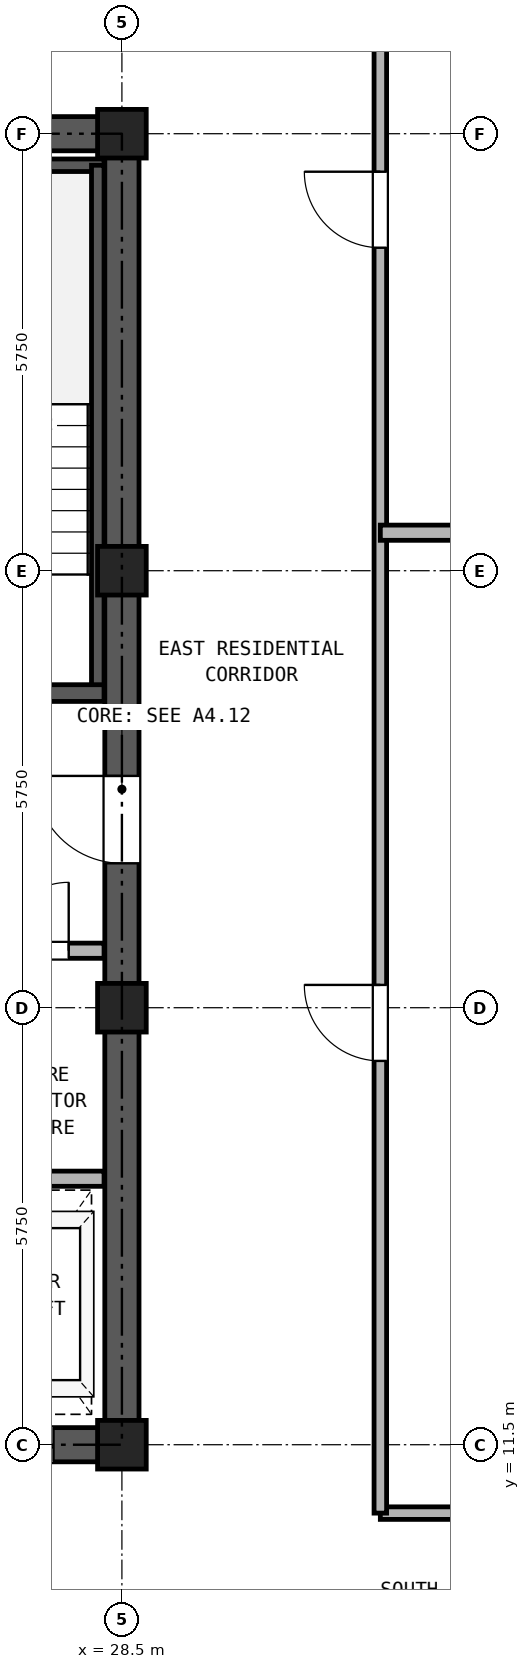
"""IFC4 building model, lengths in metres.
Left out: names, types, materials, properties, quantities, classifications, styles, units other than length and angle.
Written with IfcOpenShell. Run it as: python <this file> out.ifc"""

import sys

from ifc_helpers import new_model, si_unit, direction, frame, frame_2d, origin, origin_2d, place, context, subcontext, project, spatial, rectangle, hollow_rectangle, extrude, source, transform, mapped, element, fill, save


model = new_model("IFC4")
c1 = context("Model", 3, precision=1e-05, world=origin(), true_north=direction((0.0, 1.0)))
c2 = subcontext(c1, "Body", "Model", "MODEL_VIEW")
j1 = project(units=[si_unit("LENGTHUNIT", "METRE"), si_unit("PLANEANGLEUNIT", "RADIAN")], contexts=[c1])
p1 = place(None, origin())
s1 = spatial("IfcSite", under=j1, at=p1, CompositionType="ELEMENT")
p2 = place(p1, origin())
s2 = spatial("IfcBuilding", under=s1, at=p2, CompositionType="ELEMENT")
p3 = place(p2, frame((0.0, 0.0, 196.4)))
s3 = spatial("IfcBuildingStorey", under=s2, at=p3, CompositionType="ELEMENT", Elevation=196.4)
m1 = source(origin(), c2, "Body", "SweptSolid", [
    extrude(hollow_rectangle(XDim=0.64, YDim=0.64, WallThickness=0.035, at=origin_2d()), origin(), (0.0, 0.0, 1.0), 2.95),
])
for number, where, z_axis, x_axis in (
    (1, (28.5, 11.5, 0.0), (0.0, 0.0, 1.0), (1.0, 0.0, 0.0)),
    (2, (28.5, 17.25, 0.0), (0.0, 0.0, 1.0), (1.0, 0.0, 0.0)),
    (3, (28.5, 23.0, 0.0), (0.0, 0.0, 1.0), (1.0, 0.0, 0.0)),
    (4, (28.5, 28.75, 0.0), (0.0, 0.0, 1.0), (1.0, 0.0, 0.0)),
):
    element("IfcColumn", number, at=place(p3, frame(where, z_axis=z_axis, x_axis=x_axis)), inside=s3, PredefinedType="COLUMN", context=c2, shape_type="MappedRepresentation", body=[
        mapped(m1, transform((0.0, 0.0, 0.0), x_axis=(1.0, 0.0, 0.0), y_axis=(0.0, 1.0, 0.0), z_axis=(0.0, 0.0, 1.0), scale=1.0)),
    ])
p4 = place(p3, frame((18.275, 11.5, 0.0), z_axis=(0.0, 0.0, 1.0), x_axis=(1.0, 0.0, 0.0)))
e5 = element("IfcWall", 5, at=p4, inside=s3, PredefinedType="SHEAR", context=c2, shape_type="SweptSolid", body=[
    extrude(rectangle(XDim=10.45, YDim=0.45, at=frame_2d((5.225, 0.0))), origin(), (0.0, 0.0, 1.0), 2.95),
])
p5 = place(p4, frame((1.825, 0.0, 0.0)))
e6 = element("IfcOpeningElement", 6, at=p5, cuts=e5, PredefinedType="OPENING", context=c2, shape_type="SweptSolid", body=[
    extrude(rectangle(XDim=0.95, YDim=2.15, at=frame_2d((0.475, 1.075))), frame((0.0, 0.235, 0.0), z_axis=(0.0, -1.0, 0.0), x_axis=(1.0, 0.0, 0.0)), (0.0, 0.0, 1.0), 0.47),
])
p6 = place(p4, frame((5.325, 0.0, 0.0)))
e7 = element("IfcOpeningElement", 7, at=p6, cuts=e5, PredefinedType="OPENING", context=c2, shape_type="SweptSolid", body=[
    extrude(rectangle(XDim=0.95, YDim=2.15, at=frame_2d((0.475, 1.075))), frame((0.0, 0.235, 0.0), z_axis=(0.0, -1.0, 0.0), x_axis=(1.0, 0.0, 0.0)), (0.0, 0.0, 1.0), 0.47),
])
p7 = place(p4, frame((8.225, 0.0, 0.0)))
e8 = element("IfcOpeningElement", 8, at=p7, cuts=e5, PredefinedType="OPENING", context=c2, shape_type="SweptSolid", body=[
    extrude(rectangle(XDim=1.1, YDim=2.25, at=frame_2d((0.55, 1.125))), frame((0.0, 0.235, 0.0), z_axis=(0.0, -1.0, 0.0), x_axis=(1.0, 0.0, 0.0)), (0.0, 0.0, 1.0), 0.47),
])
p8 = place(p3, frame((18.275, 28.75, 0.0), z_axis=(0.0, 0.0, 1.0), x_axis=(1.0, 0.0, 0.0)))
e9 = element("IfcWall", 9, at=p8, inside=s3, PredefinedType="SHEAR", context=c2, shape_type="SweptSolid", body=[
    extrude(rectangle(XDim=10.45, YDim=0.45, at=frame_2d((5.225, 0.0))), origin(), (0.0, 0.0, 1.0), 2.95),
])
p9 = place(p8, frame((4.105, 0.0, 0.0)))
e10 = element("IfcOpeningElement", 10, at=p9, cuts=e9, PredefinedType="OPENING", context=c2, shape_type="SweptSolid", body=[
    extrude(rectangle(XDim=0.9, YDim=2.05, at=frame_2d((0.45, 1.025))), frame((0.0, 0.235, 0.0), z_axis=(0.0, -1.0, 0.0), x_axis=(1.0, 0.0, 0.0)), (0.0, 0.0, 1.0), 0.47),
])
p10 = place(p8, frame((5.645, 0.0, 0.0)))
e11 = element("IfcOpeningElement", 11, at=p10, cuts=e9, PredefinedType="OPENING", context=c2, shape_type="SweptSolid", body=[
    extrude(rectangle(XDim=0.9, YDim=2.05, at=frame_2d((0.45, 1.025))), frame((0.0, 0.235, 0.0), z_axis=(0.0, -1.0, 0.0), x_axis=(1.0, 0.0, 0.0)), (0.0, 0.0, 1.0), 0.47),
])
p11 = place(p3, frame((28.5, 11.725, 0.0), z_axis=(0.0, 0.0, 1.0), x_axis=(0.0, 1.0, 0.0)))
e12 = element("IfcWall", 12, at=p11, inside=s3, PredefinedType="SHEAR", context=c2, shape_type="SweptSolid", body=[
    extrude(rectangle(XDim=16.8, YDim=0.45, at=frame_2d((8.4, 0.0))), origin(), (0.0, 0.0, 1.0), 2.95),
])
p12 = place(p11, frame((7.425, 0.0, 0.0)))
e13 = element("IfcOpeningElement", 13, at=p12, cuts=e12, PredefinedType="OPENING", context=c2, shape_type="SweptSolid", body=[
    extrude(rectangle(XDim=1.15, YDim=2.2, at=frame_2d((0.575, 1.1))), frame((0.0, 0.235, 0.0), z_axis=(0.0, -1.0, 0.0), x_axis=(1.0, 0.0, 0.0)), (0.0, 0.0, 1.0), 0.47),
])
p13 = place(p3, frame((25.13, 28.335, 0.0), z_axis=(0.0, 0.0, 1.0), x_axis=(1.0, 0.0, 0.0)))
e14 = element("IfcWall", 14, at=p13, inside=s3, PredefinedType="PARTITIONING", context=c2, shape_type="SweptSolid", body=[
    extrude(rectangle(XDim=3.135, YDim=0.165, at=frame_2d((1.567, 0.0))), origin(), (0.0, 0.0, 1.0), 2.95),
])
p14 = place(p3, frame((28.183, 21.39, 0.0), z_axis=(0.0, 0.0, 1.0), x_axis=(0.0, 1.0, 0.0)))
e15 = element("IfcWall", 15, at=p14, inside=s3, PredefinedType="PARTITIONING", context=c2, shape_type="SweptSolid", body=[
    extrude(rectangle(XDim=6.945, YDim=0.165, at=frame_2d((3.473, 0.0))), origin(), (0.0, 0.0, 1.0), 2.95),
])
p15 = place(p3, frame((25.13, 21.39, 0.0), z_axis=(0.0, 0.0, 1.0), x_axis=(1.0, 0.0, 0.0)))
e16 = element("IfcWall", 16, at=p15, inside=s3, PredefinedType="SOLIDWALL", context=c2, shape_type="SweptSolid", body=[
    extrude(rectangle(XDim=3.135, YDim=0.22, at=frame_2d((1.567, 0.0))), origin(), (0.0, 0.0, 1.0), 2.95),
])
p16 = place(p15, frame((0.92, 0.0, 0.0)))
e17 = element("IfcOpeningElement", 17, at=p16, cuts=e16, PredefinedType="OPENING", context=c2, shape_type="SweptSolid", body=[
    extrude(rectangle(XDim=1.15, YDim=2.2, at=frame_2d((0.575, 1.1))), frame((0.0, 0.12, 0.0), z_axis=(0.0, -1.0, 0.0), x_axis=(1.0, 0.0, 0.0)), (0.0, 0.0, 1.0), 0.24),
])
p17 = place(p3, frame((18.735, 18.0, 0.0), z_axis=(0.0, 0.0, 1.0), x_axis=(1.0, 0.0, 0.0)))
e18 = element("IfcWall", 18, at=p17, inside=s3, PredefinedType="PARTITIONING", context=c2, shape_type="SweptSolid", body=[
    extrude(rectangle(XDim=9.53, YDim=0.2, at=frame_2d((4.765, 0.0))), origin(), (0.0, 0.0, 1.0), 2.95),
])
p18 = place(p17, frame((0.515, 0.0, 0.0)))
e19 = element("IfcOpeningElement", 19, at=p18, cuts=e18, PredefinedType="OPENING", context=c2, shape_type="SweptSolid", body=[
    extrude(rectangle(XDim=1.3, YDim=2.3, at=frame_2d((0.65, 1.15))), frame((0.0, 0.11, 0.0), z_axis=(0.0, -1.0, 0.0), x_axis=(1.0, 0.0, 0.0)), (0.0, 0.0, 1.0), 0.22),
])
p19 = place(p17, frame((2.615, 0.0, 0.0)))
e20 = element("IfcOpeningElement", 20, at=p19, cuts=e18, PredefinedType="OPENING", context=c2, shape_type="SweptSolid", body=[
    extrude(rectangle(XDim=1.3, YDim=2.3, at=frame_2d((0.65, 1.15))), frame((0.0, 0.11, 0.0), z_axis=(0.0, -1.0, 0.0), x_axis=(1.0, 0.0, 0.0)), (0.0, 0.0, 1.0), 0.22),
])
p20 = place(p17, frame((5.035, 0.0, 0.0)))
e21 = element("IfcOpeningElement", 21, at=p20, cuts=e18, PredefinedType="OPENING", context=c2, shape_type="SweptSolid", body=[
    extrude(rectangle(XDim=0.9, YDim=2.05, at=frame_2d((0.45, 1.025))), frame((0.0, 0.11, 0.0), z_axis=(0.0, -1.0, 0.0), x_axis=(1.0, 0.0, 0.0)), (0.0, 0.0, 1.0), 0.22),
])
p21 = place(p17, frame((8.165, 0.0, 0.0)))
e22 = element("IfcOpeningElement", 22, at=p21, cuts=e18, PredefinedType="OPENING", context=c2, shape_type="SweptSolid", body=[
    extrude(rectangle(XDim=0.9, YDim=2.05, at=frame_2d((0.45, 1.025))), frame((0.0, 0.11, 0.0), z_axis=(0.0, -1.0, 0.0), x_axis=(1.0, 0.0, 0.0)), (0.0, 0.0, 1.0), 0.22),
])
p22 = place(p3, frame((18.735, 15.0, 0.0), z_axis=(0.0, 0.0, 1.0), x_axis=(1.0, 0.0, 0.0)))
e23 = element("IfcWall", 23, at=p22, inside=s3, PredefinedType="PARTITIONING", context=c2, shape_type="SweptSolid", body=[
    extrude(rectangle(XDim=9.53, YDim=0.2, at=frame_2d((4.765, 0.0))), origin(), (0.0, 0.0, 1.0), 2.95),
])
p23 = place(p3, frame((31.9, 10.6, 0.0), z_axis=(0.0, 0.0, 1.0), x_axis=(1.0, 0.0, 0.0)))
e24 = element("IfcWall", 24, at=p23, inside=s3, PredefinedType="PARTITIONING", context=c2, shape_type="SweptSolid", body=[
    extrude(rectangle(XDim=6.3, YDim=0.165, at=frame_2d((3.15, 0.0))), origin(), (0.0, 0.0, 1.0), 2.95),
])
p24 = place(p3, frame((31.9, 10.6, 0.0), z_axis=(0.0, 0.0, 1.0), x_axis=(0.0, 1.0, 0.0)))
e25 = element("IfcWall", 25, at=p24, inside=s3, PredefinedType="PARTITIONING", context=c2, shape_type="SweptSolid", body=[
    extrude(rectangle(XDim=24.54, YDim=0.165, at=frame_2d((12.27, 0.0))), origin(), (0.0, 0.0, 1.0), 2.95),
])
p25 = place(p24, frame((5.95, 0.0, 0.0)))
e26 = element("IfcOpeningElement", 26, at=p25, cuts=e25, PredefinedType="OPENING", context=c2, shape_type="SweptSolid", body=[
    extrude(rectangle(XDim=1.0, YDim=2.15, at=frame_2d((0.5, 1.075))), frame((0.0, 0.093, 0.0), z_axis=(0.0, -1.0, 0.0), x_axis=(1.0, 0.0, 0.0)), (0.0, 0.0, 1.0), 0.185),
])
p26 = place(p24, frame((16.65, 0.0, 0.0)))
e27 = element("IfcOpeningElement", 27, at=p26, cuts=e25, PredefinedType="OPENING", context=c2, shape_type="SweptSolid", body=[
    extrude(rectangle(XDim=1.0, YDim=2.15, at=frame_2d((0.5, 1.075))), frame((0.0, 0.093, 0.0), z_axis=(0.0, -1.0, 0.0), x_axis=(1.0, 0.0, 0.0)), (0.0, 0.0, 1.0), 0.185),
])
p27 = place(p3, frame((31.9, 23.5, 0.0), z_axis=(0.0, 0.0, 1.0), x_axis=(1.0, 0.0, 0.0)))
e28 = element("IfcWall", 28, at=p27, inside=s3, PredefinedType="PARTITIONING", context=c2, shape_type="SweptSolid", body=[
    extrude(rectangle(XDim=9.74, YDim=0.2, at=frame_2d((4.87, 0.0))), origin(), (0.0, 0.0, 1.0), 2.95),
])
p28 = place(p21, frame((0.9, 0.0, 0.0), z_axis=(0.0, 0.0, 1.0), x_axis=(-1.0, 0.0, 0.0)))
e29 = element("IfcDoor", 29, at=p28, inside=s3, OperationType="SINGLE_SWING_RIGHT", PredefinedType="DOOR", context=c2, shape_type="SweptSolid", body=[
    extrude(rectangle(XDim=0.9, YDim=2.05, at=frame_2d((0.45, 1.025))), frame((0.0, 0.025, 0.0), z_axis=(0.0, -1.0, 0.0), x_axis=(1.0, 0.0, 0.0)), (0.0, 0.0, 1.0), 0.05),
])
fill(e22, e29)
p29 = place(p12, origin())
e30 = element("IfcDoor", 30, at=p29, inside=s3, OperationType="SINGLE_SWING_RIGHT", PredefinedType="DOOR", context=c2, shape_type="SweptSolid", body=[
    extrude(rectangle(XDim=1.15, YDim=2.2, at=frame_2d((0.575, 1.1))), frame((0.0, 0.025, 0.0), z_axis=(0.0, -1.0, 0.0), x_axis=(1.0, 0.0, 0.0)), (0.0, 0.0, 1.0), 0.05),
])
fill(e13, e30)
p30 = place(p7, frame((1.1, 0.0, 0.0), z_axis=(0.0, 0.0, 1.0), x_axis=(-1.0, 0.0, 0.0)))
e31 = element("IfcDoor", 31, at=p30, inside=s3, OperationType="DOUBLE_DOOR_SLIDING", PredefinedType="DOOR", context=c2, shape_type="SweptSolid", body=[
    extrude(rectangle(XDim=1.1, YDim=2.25, at=frame_2d((0.55, 1.125))), frame((0.0, 0.025, 0.0), z_axis=(0.0, -1.0, 0.0), x_axis=(1.0, 0.0, 0.0)), (0.0, 0.0, 1.0), 0.05),
])
fill(e8, e31)
p31 = place(p25, frame((1.0, 0.0, 0.0), z_axis=(0.0, 0.0, 1.0), x_axis=(-1.0, 0.0, 0.0)))
e32 = element("IfcDoor", 32, at=p31, inside=s3, OperationType="SINGLE_SWING_RIGHT", PredefinedType="DOOR", context=c2, shape_type="SweptSolid", body=[
    extrude(rectangle(XDim=1.0, YDim=2.15, at=frame_2d((0.5, 1.075))), frame((0.0, 0.025, 0.0), z_axis=(0.0, -1.0, 0.0), x_axis=(1.0, 0.0, 0.0)), (0.0, 0.0, 1.0), 0.05),
])
fill(e26, e32)
p32 = place(p26, frame((1.0, 0.0, 0.0), z_axis=(0.0, 0.0, 1.0), x_axis=(-1.0, 0.0, 0.0)))
e33 = element("IfcDoor", 33, at=p32, inside=s3, OperationType="SINGLE_SWING_RIGHT", PredefinedType="DOOR", context=c2, shape_type="SweptSolid", body=[
    extrude(rectangle(XDim=1.0, YDim=2.15, at=frame_2d((0.5, 1.075))), frame((0.0, 0.025, 0.0), z_axis=(0.0, -1.0, 0.0), x_axis=(1.0, 0.0, 0.0)), (0.0, 0.0, 1.0), 0.05),
])
fill(e27, e33)
save(model, sys.argv[1])
